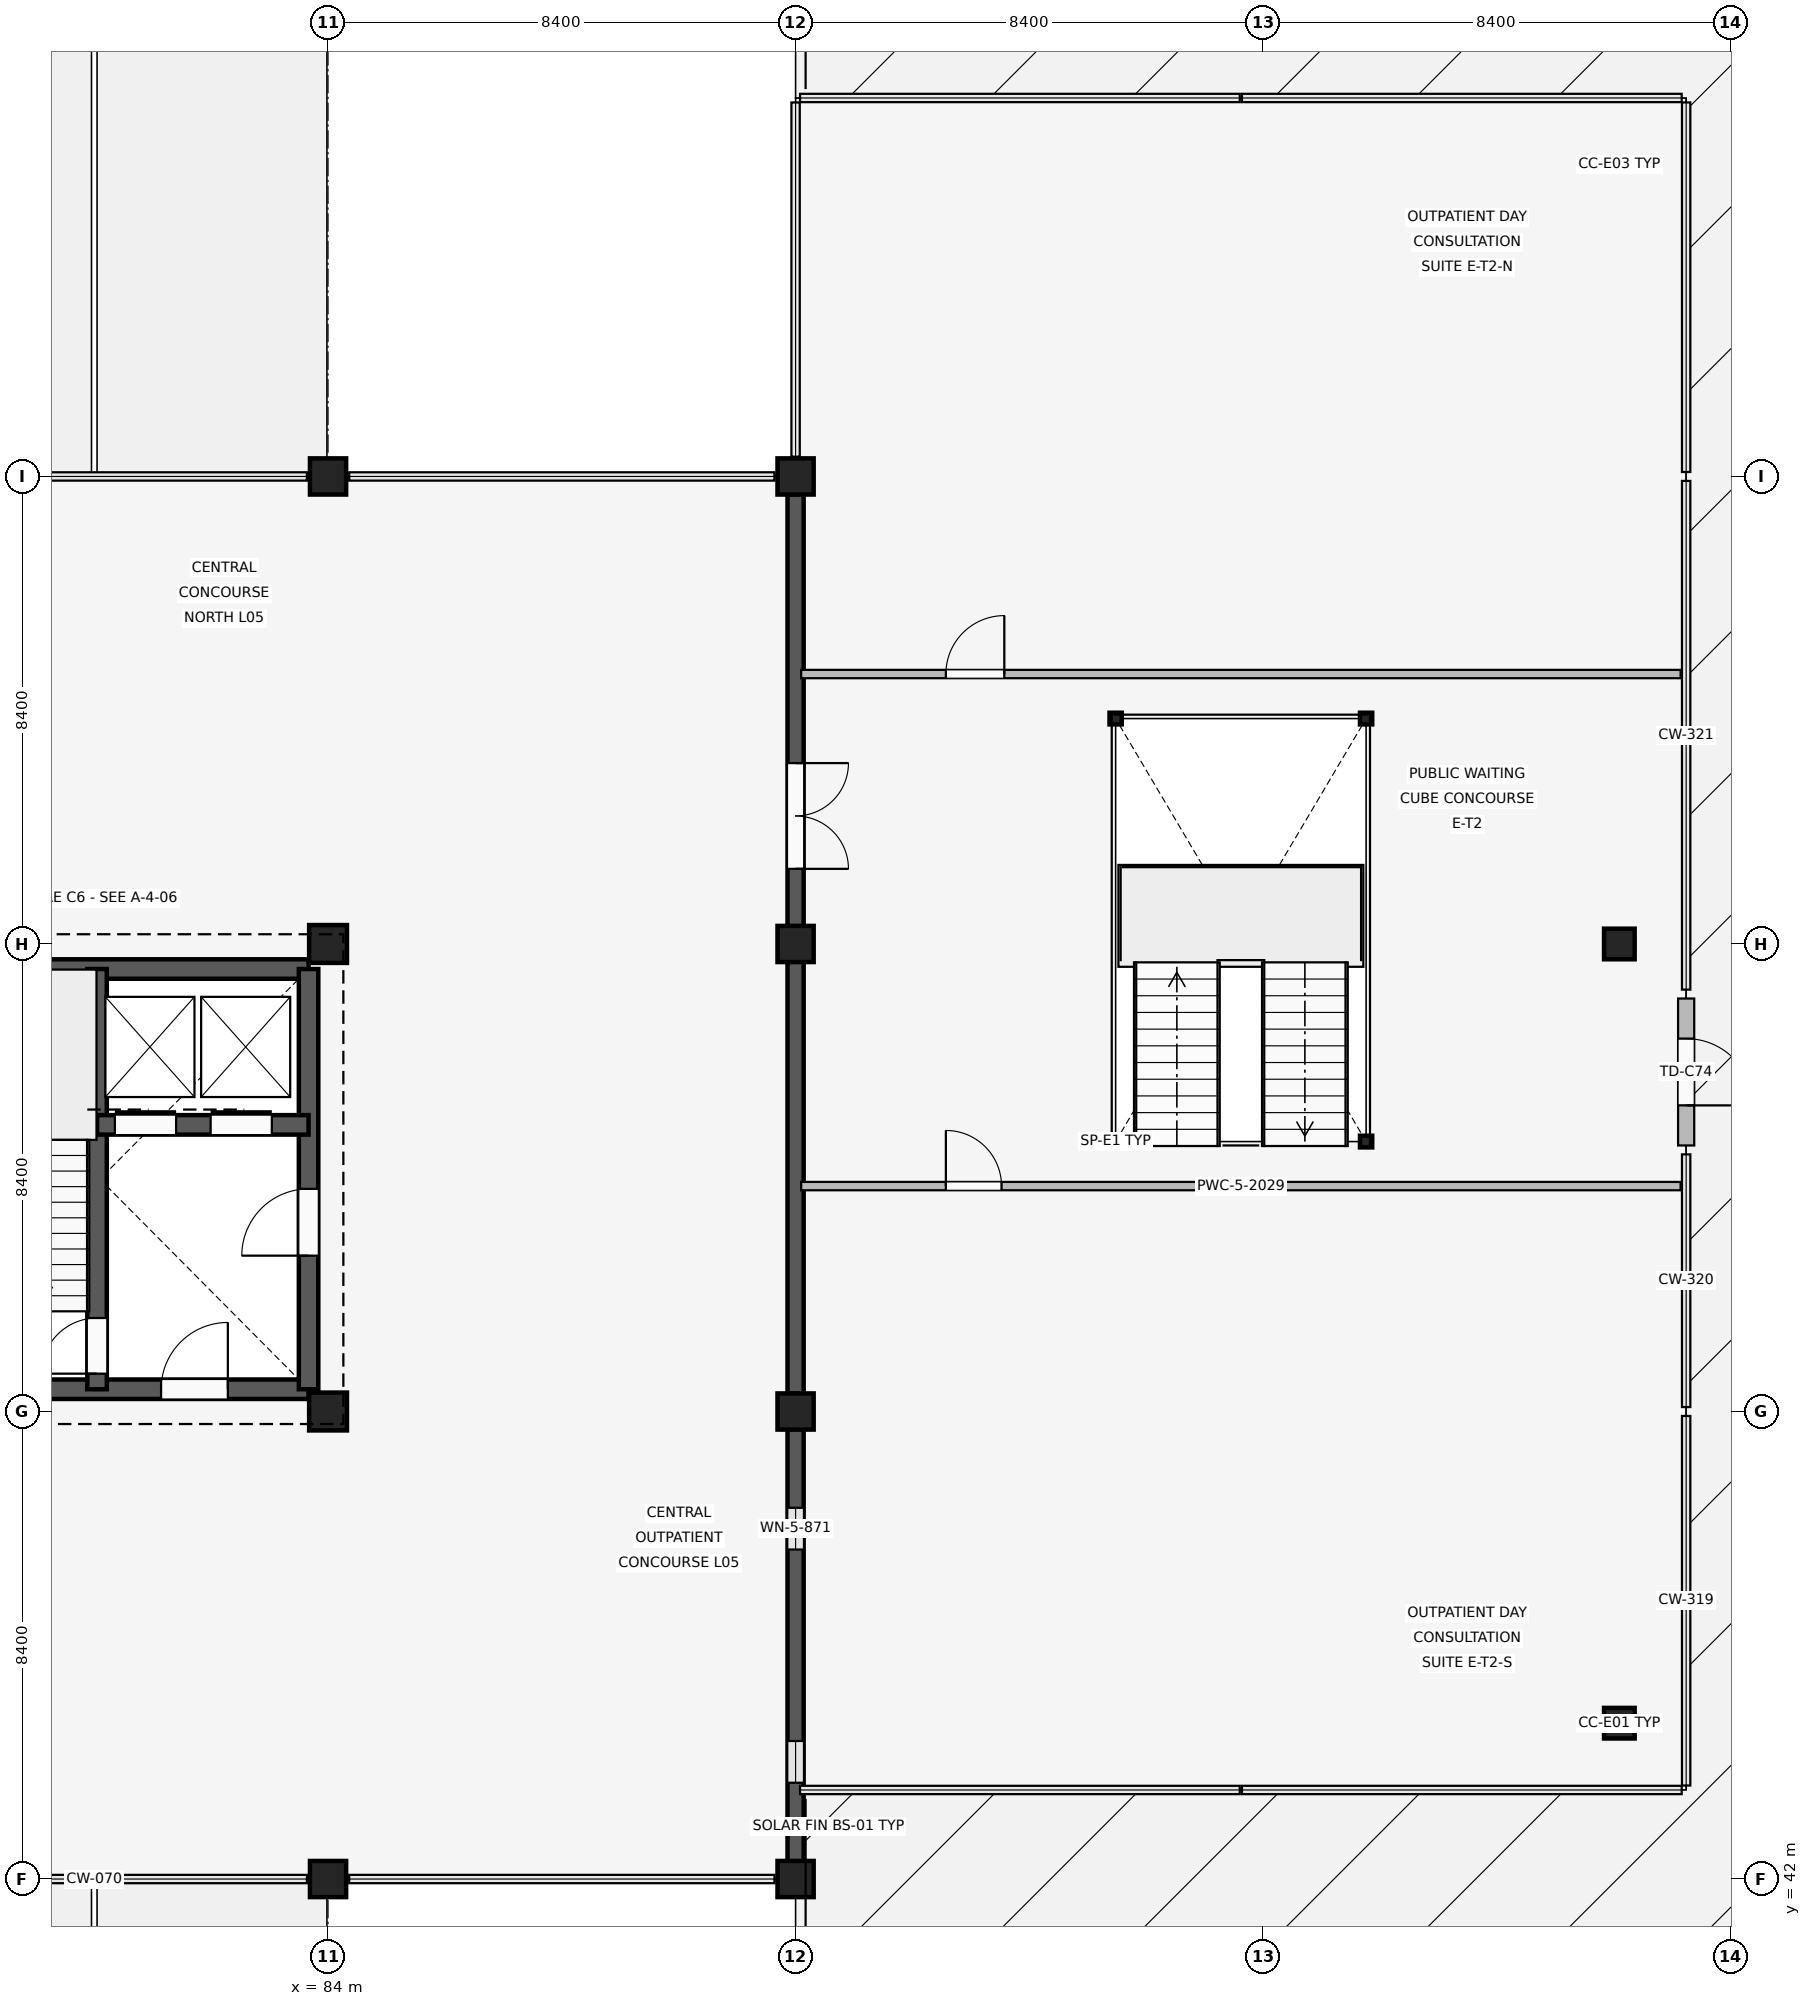
"""IFC4 building model, lengths in metres.
Left out: names, types, materials, properties, quantities, classifications, styles, units other than length and angle.
Written with IfcOpenShell. Run it as: python <this file> out.ifc"""

import sys

from ifc_helpers import new_model, si_unit, direction, frame, frame_2d, origin, origin_2d, place, context, subcontext, project, spatial, rectangle, i_section, extrude, element, fill, save


model = new_model("IFC4")
c1 = context("Model", 3, precision=1e-05, world=origin(), true_north=direction((0.0, 1.0)))
c2 = subcontext(c1, "Body", "Model", "MODEL_VIEW")
j1 = project(units=[si_unit("LENGTHUNIT", "METRE"), si_unit("PLANEANGLEUNIT", "RADIAN")], contexts=[c1])
p1 = place(None, origin())
s1 = spatial("IfcSite", under=j1, at=p1, CompositionType="ELEMENT")
p2 = place(p1, origin())
s2 = spatial("IfcBuilding", under=s1, at=p2, CompositionType="ELEMENT")
p3 = place(p2, frame((0.0, 0.0, 20.4)))
s3 = spatial("IfcBuildingStorey", under=s2, at=p3, CompositionType="ELEMENT", Elevation=20.4)
p4 = place(p3, frame((84.0, 42.0, 0.0), z_axis=(0.0, 0.0, 1.0), x_axis=(1.0, 0.0, 0.0)))
e1 = element("IfcColumn", 1, at=p4, inside=s3, PredefinedType="COLUMN", context=c2, shape_type="SweptSolid", body=[
    extrude(rectangle(XDim=0.65, YDim=0.65, at=origin_2d()), origin(), (0.0, 0.0, 1.0), 4.2),
])
for number, where, z_axis, x_axis in (
    (2, (84.0, 50.4, 0.0), (0.0, 0.0, 1.0), (1.0, 0.0, 0.0)),
    (3, (84.0, 58.8, 0.0), (0.0, 0.0, 1.0), (1.0, 0.0, 0.0)),
):
    element("IfcColumn", number, at=place(p3, frame(where, z_axis=z_axis, x_axis=x_axis)), inside=s3, PredefinedType="COLUMN", context=c2, shape_type="SweptSolid", body=[
        extrude(rectangle(XDim=0.68, YDim=0.68, at=origin_2d()), origin(), (0.0, 0.0, 1.0), 4.2),
    ])
for number, where, z_axis, x_axis in (
    (4, (84.0, 67.2, 0.0), (0.0, 0.0, 1.0), (1.0, 0.0, 0.0)),
    (5, (92.4, 42.0, 0.0), (0.0, 0.0, 1.0), (1.0, 0.0, 0.0)),
    (6, (92.4, 50.4, 0.0), (0.0, 0.0, 1.0), (1.0, 0.0, 0.0)),
    (7, (92.4, 58.8, 0.0), (0.0, 0.0, 1.0), (1.0, 0.0, 0.0)),
    (8, (92.4, 67.2, 0.0), (0.0, 0.0, 1.0), (1.0, 0.0, 0.0)),
):
    element("IfcColumn", number, at=place(p3, frame(where, z_axis=z_axis, x_axis=x_axis)), inside=s3, PredefinedType="COLUMN", context=c2, shape_type="SweptSolid", body=[
        extrude(rectangle(XDim=0.65, YDim=0.65, at=origin_2d()), origin(), (0.0, 0.0, 1.0), 4.2),
    ])
for number, where, z_axis, x_axis in (
    (9, (107.2, 44.8, 0.0), (0.0, 0.0, 1.0), (1.0, 0.0, 0.0)),
    (10, (107.2, 58.8, 0.0), (0.0, 0.0, 1.0), (1.0, 0.0, 0.0)),
):
    element("IfcColumn", number, at=place(p3, frame(where, z_axis=z_axis, x_axis=x_axis)), inside=s3, PredefinedType="COLUMN", context=c2, shape_type="SweptSolid", body=[
        extrude(rectangle(XDim=0.55, YDim=0.55, at=origin_2d()), origin(), (0.0, 0.0, 1.0), 4.2),
    ])
p5 = place(p3, frame((107.2, 72.8, 0.0), z_axis=(0.0, 0.0, 1.0), x_axis=(1.0, 0.0, 0.0)))
e11 = element("IfcColumn", 11, at=p5, inside=s3, PredefinedType="COLUMN", context=c2, shape_type="SweptSolid", body=[
    extrude(i_section(OverallWidth=0.22, OverallDepth=0.22, WebThickness=0.01, FlangeThickness=0.016, at=origin_2d()), origin(), (0.0, 0.0, 1.0), 4.2),
])
for number, where, z_axis, x_axis in (
    (12, (98.15, 55.25, 0.0), (0.0, 0.0, 1.0), (1.0, 0.0, 0.0)),
    (13, (102.65, 55.25, 0.0), (0.0, 0.0, 1.0), (1.0, 0.0, 0.0)),
    (14, (98.15, 62.85, 0.0), (0.0, 0.0, 1.0), (1.0, 0.0, 0.0)),
    (15, (102.65, 62.85, 0.0), (0.0, 0.0, 1.0), (1.0, 0.0, 0.0)),
):
    element("IfcColumn", number, at=place(p3, frame(where, z_axis=z_axis, x_axis=x_axis)), inside=s3, PredefinedType="COLUMN", context=c2, shape_type="SweptSolid", body=[
        extrude(i_section(OverallWidth=0.22, OverallDepth=0.21, WebThickness=0.007, FlangeThickness=0.011, at=origin_2d()), origin(), (0.0, 0.0, 1.0), 4.2),
    ])
p6 = place(p3, frame((92.4, 50.08, 0.0), z_axis=(0.0, 0.0, 1.0), x_axis=(0.0, -1.0, 0.0)))
e16 = element("IfcWall", 16, at=p6, inside=s3, PredefinedType="SOLIDWALL", context=c2, shape_type="SweptSolid", body=[
    extrude(rectangle(XDim=7.76, YDim=0.29, at=frame_2d((3.88, 0.0))), origin(), (0.0, 0.0, 1.0), 3.34),
])
p7 = place(p6, frame((1.41, 0.0, 0.85)))
e17 = element("IfcOpeningElement", 17, at=p7, cuts=e16, PredefinedType="OPENING", context=c2, shape_type="SweptSolid", body=[
    extrude(rectangle(XDim=0.75, YDim=1.85, at=frame_2d((0.375, 0.925))), frame((0.0, 0.155, 0.0), z_axis=(0.0, -1.0, 0.0), x_axis=(1.0, 0.0, 0.0)), (0.0, 0.0, 1.0), 0.31),
])
p8 = place(p6, frame((5.6, 0.0, 0.85)))
e18 = element("IfcOpeningElement", 18, at=p8, cuts=e16, PredefinedType="OPENING", context=c2, shape_type="SweptSolid", body=[
    extrude(rectangle(XDim=0.75, YDim=1.85, at=frame_2d((0.375, 0.925))), frame((0.0, 0.155, 0.0), z_axis=(0.0, -1.0, 0.0), x_axis=(1.0, 0.0, 0.0)), (0.0, 0.0, 1.0), 0.31),
])
p9 = place(p3, frame((92.4, 58.48, 0.0), z_axis=(0.0, 0.0, 1.0), x_axis=(0.0, -1.0, 0.0)))
e19 = element("IfcWall", 19, at=p9, inside=s3, PredefinedType="SOLIDWALL", context=c2, shape_type="SweptSolid", body=[
    extrude(rectangle(XDim=7.76, YDim=0.29, at=frame_2d((3.88, 0.0))), origin(), (0.0, 0.0, 1.0), 3.34),
])
p10 = place(p3, frame((92.4, 66.88, 0.0), z_axis=(0.0, 0.0, 1.0), x_axis=(0.0, -1.0, 0.0)))
e20 = element("IfcWall", 20, at=p10, inside=s3, PredefinedType="SOLIDWALL", context=c2, shape_type="SweptSolid", body=[
    extrude(rectangle(XDim=7.76, YDim=0.29, at=frame_2d((3.88, 0.0))), origin(), (0.0, 0.0, 1.0), 3.34),
])
p11 = place(p10, frame((4.83, 0.0, 0.0)))
e21 = element("IfcOpeningElement", 21, at=p11, cuts=e20, PredefinedType="OPENING", context=c2, shape_type="SweptSolid", body=[
    extrude(rectangle(XDim=1.9, YDim=2.4, at=frame_2d((0.95, 1.2))), frame((0.0, 0.155, 0.0), z_axis=(0.0, -1.0, 0.0), x_axis=(1.0, 0.0, 0.0)), (0.0, 0.0, 1.0), 0.31),
])
p12 = place(p3, frame((108.4, 57.82, 0.0), z_axis=(0.0, 0.0, 1.0), x_axis=(0.0, -1.0, 0.0)))
e22 = element("IfcWall", 22, at=p12, inside=s3, PredefinedType="SOLIDWALL", context=c2, shape_type="SweptSolid", body=[
    extrude(rectangle(XDim=2.64, YDim=0.29, at=frame_2d((1.32, 0.0))), origin(), (0.0, 0.0, 1.0), 3.96),
])
p13 = place(p12, frame((0.72, 0.0, 0.0)))
e23 = element("IfcOpeningElement", 23, at=p13, cuts=e22, PredefinedType="OPENING", context=c2, shape_type="SweptSolid", body=[
    extrude(rectangle(XDim=1.2, YDim=2.25, at=frame_2d((0.6, 1.125))), frame((0.0, 0.155, 0.0), z_axis=(0.0, -1.0, 0.0), x_axis=(1.0, 0.0, 0.0)), (0.0, 0.0, 1.0), 0.31),
])
p14 = place(p3, frame((76.15, 50.8, 0.0), z_axis=(0.0, 0.0, 1.0), x_axis=(1.0, 0.0, 0.0)))
e24 = element("IfcWall", 24, at=p14, inside=s3, PredefinedType="SHEAR", context=c2, shape_type="SweptSolid", body=[
    extrude(rectangle(XDim=7.5, YDim=0.35, at=frame_2d((3.75, 0.0))), origin(), (0.0, 0.0, 1.0), 3.92),
])
p15 = place(p14, frame((4.85, 0.0, 0.0)))
e25 = element("IfcOpeningElement", 25, at=p15, cuts=e24, PredefinedType="OPENING", context=c2, shape_type="SweptSolid", body=[
    extrude(rectangle(XDim=1.2, YDim=2.2, at=frame_2d((0.6, 1.1))), frame((0.0, 0.185, 0.0), z_axis=(0.0, -1.0, 0.0), x_axis=(1.0, 0.0, 0.0)), (0.0, 0.0, 1.0), 0.37),
])
p16 = place(p3, frame((76.15, 58.35, 0.0), z_axis=(0.0, 0.0, 1.0), x_axis=(1.0, 0.0, 0.0)))
e26 = element("IfcWall", 26, at=p16, inside=s3, PredefinedType="SHEAR", context=c2, shape_type="SweptSolid", body=[
    extrude(rectangle(XDim=7.5, YDim=0.35, at=frame_2d((3.75, 0.0))), origin(), (0.0, 0.0, 1.0), 3.92),
])
p17 = place(p3, frame((83.65, 50.8, 0.0), z_axis=(0.0, 0.0, 1.0), x_axis=(0.0, 1.0, 0.0)))
e27 = element("IfcWall", 27, at=p17, inside=s3, PredefinedType="SHEAR", context=c2, shape_type="SweptSolid", body=[
    extrude(rectangle(XDim=7.55, YDim=0.35, at=frame_2d((3.775, 0.0))), origin(), (0.0, 0.0, 1.0), 3.92),
])
p18 = place(p17, frame((2.4, 0.0, 0.0)))
e28 = element("IfcOpeningElement", 28, at=p18, cuts=e27, PredefinedType="OPENING", context=c2, shape_type="SweptSolid", body=[
    extrude(rectangle(XDim=1.2, YDim=2.2, at=frame_2d((0.6, 1.1))), frame((0.0, 0.185, 0.0), z_axis=(0.0, -1.0, 0.0), x_axis=(1.0, 0.0, 0.0)), (0.0, 0.0, 1.0), 0.37),
])
p19 = place(p3, frame((79.85, 50.8, 0.0), z_axis=(0.0, 0.0, 1.0), x_axis=(0.0, 1.0, 0.0)))
e29 = element("IfcWall", 29, at=p19, inside=s3, PredefinedType="SHEAR", context=c2, shape_type="SweptSolid", body=[
    extrude(rectangle(XDim=7.55, YDim=0.35, at=frame_2d((3.775, 0.0))), origin(), (0.0, 0.0, 1.0), 3.92),
])
p20 = place(p19, frame((0.28, 0.0, 0.0)))
e30 = element("IfcOpeningElement", 30, at=p20, cuts=e29, PredefinedType="OPENING", context=c2, shape_type="SweptSolid", body=[
    extrude(rectangle(XDim=1.0, YDim=2.15, at=frame_2d((0.5, 1.075))), frame((0.0, 0.185, 0.0), z_axis=(0.0, -1.0, 0.0), x_axis=(1.0, 0.0, 0.0)), (0.0, 0.0, 1.0), 0.37),
])
p21 = place(p3, frame((79.85, 55.55, 0.0), z_axis=(0.0, 0.0, 1.0), x_axis=(1.0, 0.0, 0.0)))
e31 = element("IfcWall", 31, at=p21, inside=s3, PredefinedType="SHEAR", context=c2, shape_type="SweptSolid", body=[
    extrude(rectangle(XDim=3.8, YDim=0.35, at=frame_2d((1.9, 0.0))), origin(), (0.0, 0.0, 1.0), 3.92),
])
p22 = place(p21, frame((0.32, 0.0, 0.0)))
e32 = element("IfcOpeningElement", 32, at=p22, cuts=e31, PredefinedType="OPENING", context=c2, shape_type="SweptSolid", body=[
    extrude(rectangle(XDim=1.1, YDim=2.15, at=frame_2d((0.55, 1.075))), frame((0.0, 0.185, 0.0), z_axis=(0.0, -1.0, 0.0), x_axis=(1.0, 0.0, 0.0)), (0.0, 0.0, 1.0), 0.37),
])
p23 = place(p21, frame((2.04, 0.0, 0.0)))
e33 = element("IfcOpeningElement", 33, at=p23, cuts=e31, PredefinedType="OPENING", context=c2, shape_type="SweptSolid", body=[
    extrude(rectangle(XDim=1.1, YDim=2.15, at=frame_2d((0.55, 1.075))), frame((0.0, 0.185, 0.0), z_axis=(0.0, -1.0, 0.0), x_axis=(1.0, 0.0, 0.0)), (0.0, 0.0, 1.0), 0.37),
])
p24 = place(p3, frame((92.5, 54.45, 0.0), z_axis=(0.0, 0.0, 1.0), x_axis=(1.0, 0.0, 0.0)))
e34 = element("IfcWall", 34, at=p24, inside=s3, PredefinedType="PARTITIONING", context=c2, shape_type="SweptSolid", body=[
    extrude(rectangle(XDim=15.8, YDim=0.15, at=frame_2d((7.9, 0.0))), origin(), (0.0, 0.0, 1.0), 3.49),
])
p25 = place(p24, frame((2.6, 0.0, 0.0)))
e35 = element("IfcOpeningElement", 35, at=p25, cuts=e34, PredefinedType="OPENING", context=c2, shape_type="SweptSolid", body=[
    extrude(rectangle(XDim=1.0, YDim=2.15, at=frame_2d((0.5, 1.075))), frame((0.0, 0.085, 0.0), z_axis=(0.0, -1.0, 0.0), x_axis=(1.0, 0.0, 0.0)), (0.0, 0.0, 1.0), 0.17),
])
p26 = place(p3, frame((92.5, 63.65, 0.0), z_axis=(0.0, 0.0, 1.0), x_axis=(1.0, 0.0, 0.0)))
e36 = element("IfcWall", 36, at=p26, inside=s3, PredefinedType="PARTITIONING", context=c2, shape_type="SweptSolid", body=[
    extrude(rectangle(XDim=15.8, YDim=0.15, at=frame_2d((7.9, 0.0))), origin(), (0.0, 0.0, 1.0), 3.49),
])
p27 = place(p26, frame((2.6, 0.0, 0.0)))
e37 = element("IfcOpeningElement", 37, at=p27, cuts=e36, PredefinedType="OPENING", context=c2, shape_type="SweptSolid", body=[
    extrude(rectangle(XDim=1.05, YDim=2.2, at=frame_2d((0.525, 1.1))), frame((0.0, 0.085, 0.0), z_axis=(0.0, -1.0, 0.0), x_axis=(1.0, 0.0, 0.0)), (0.0, 0.0, 1.0), 0.17),
])
p28 = place(p7, origin())
e38 = element("IfcWindow", 38, at=p28, inside=s3, PartitioningType="SINGLE_PANEL", PredefinedType="WINDOW", context=c2, shape_type="SweptSolid", body=[
    extrude(rectangle(XDim=0.75, YDim=1.85, at=frame_2d((0.375, 0.925))), frame((0.0, 0.03, 0.0), z_axis=(0.0, -1.0, 0.0), x_axis=(1.0, 0.0, 0.0)), (0.0, 0.0, 1.0), 0.06),
])
fill(e17, e38)
p29 = place(p8, origin())
e39 = element("IfcWindow", 39, at=p29, inside=s3, PartitioningType="SINGLE_PANEL", PredefinedType="WINDOW", context=c2, shape_type="SweptSolid", body=[
    extrude(rectangle(XDim=0.75, YDim=1.85, at=frame_2d((0.375, 0.925))), frame((0.0, 0.03, 0.0), z_axis=(0.0, -1.0, 0.0), x_axis=(1.0, 0.0, 0.0)), (0.0, 0.0, 1.0), 0.06),
])
fill(e18, e39)
p30 = place(p11, origin())
e40 = element("IfcDoor", 40, at=p30, inside=s3, OperationType="DOUBLE_SWING_LEFT", PredefinedType="DOOR", context=c2, shape_type="SweptSolid", body=[
    extrude(rectangle(XDim=1.9, YDim=2.4, at=frame_2d((0.95, 1.2))), frame((0.0, 0.025, 0.0), z_axis=(0.0, -1.0, 0.0), x_axis=(1.0, 0.0, 0.0)), (0.0, 0.0, 1.0), 0.05),
])
fill(e21, e40)
p31 = place(p13, origin())
e41 = element("IfcDoor", 41, at=p31, inside=s3, OperationType="SINGLE_SWING_RIGHT", PredefinedType="DOOR", context=c2, shape_type="SweptSolid", body=[
    extrude(rectangle(XDim=1.2, YDim=2.25, at=frame_2d((0.6, 1.125))), frame((0.0, 0.025, 0.0), z_axis=(0.0, -1.0, 0.0), x_axis=(1.0, 0.0, 0.0)), (0.0, 0.0, 1.0), 0.05),
])
fill(e23, e41)
p32 = place(p18, origin())
e42 = element("IfcDoor", 42, at=p32, inside=s3, OperationType="SINGLE_SWING_LEFT", PredefinedType="DOOR", context=c2, shape_type="SweptSolid", body=[
    extrude(rectangle(XDim=1.2, YDim=2.2, at=frame_2d((0.6, 1.1))), frame((0.0, 0.025, 0.0), z_axis=(0.0, -1.0, 0.0), x_axis=(1.0, 0.0, 0.0)), (0.0, 0.0, 1.0), 0.05),
])
fill(e28, e42)
p33 = place(p15, origin())
e43 = element("IfcDoor", 43, at=p33, inside=s3, OperationType="SINGLE_SWING_RIGHT", PredefinedType="DOOR", context=c2, shape_type="SweptSolid", body=[
    extrude(rectangle(XDim=1.2, YDim=2.2, at=frame_2d((0.6, 1.1))), frame((0.0, 0.025, 0.0), z_axis=(0.0, -1.0, 0.0), x_axis=(1.0, 0.0, 0.0)), (0.0, 0.0, 1.0), 0.05),
])
fill(e25, e43)
p34 = place(p20, origin())
e44 = element("IfcDoor", 44, at=p34, inside=s3, OperationType="SINGLE_SWING_LEFT", PredefinedType="DOOR", context=c2, shape_type="SweptSolid", body=[
    extrude(rectangle(XDim=1.0, YDim=2.15, at=frame_2d((0.5, 1.075))), frame((0.0, 0.025, 0.0), z_axis=(0.0, -1.0, 0.0), x_axis=(1.0, 0.0, 0.0)), (0.0, 0.0, 1.0), 0.05),
])
fill(e30, e44)
p35 = place(p22, origin())
e45 = element("IfcDoor", 45, at=p35, inside=s3, OperationType="SLIDING_TO_LEFT", PredefinedType="DOOR", context=c2, shape_type="SweptSolid", body=[
    extrude(rectangle(XDim=1.1, YDim=2.15, at=frame_2d((0.55, 1.075))), frame((0.0, 0.025, 0.0), z_axis=(0.0, -1.0, 0.0), x_axis=(1.0, 0.0, 0.0)), (0.0, 0.0, 1.0), 0.05),
])
fill(e32, e45)
p36 = place(p23, origin())
e46 = element("IfcDoor", 46, at=p36, inside=s3, OperationType="SLIDING_TO_LEFT", PredefinedType="DOOR", context=c2, shape_type="SweptSolid", body=[
    extrude(rectangle(XDim=1.1, YDim=2.15, at=frame_2d((0.55, 1.075))), frame((0.0, 0.025, 0.0), z_axis=(0.0, -1.0, 0.0), x_axis=(1.0, 0.0, 0.0)), (0.0, 0.0, 1.0), 0.05),
])
fill(e33, e46)
p37 = place(p25, origin())
e47 = element("IfcDoor", 47, at=p37, inside=s3, OperationType="SINGLE_SWING_LEFT", PredefinedType="DOOR", context=c2, shape_type="SweptSolid", body=[
    extrude(rectangle(XDim=1.0, YDim=2.15, at=frame_2d((0.5, 1.075))), frame((0.0, 0.025, 0.0), z_axis=(0.0, -1.0, 0.0), x_axis=(1.0, 0.0, 0.0)), (0.0, 0.0, 1.0), 0.05),
])
fill(e35, e47)
p38 = place(p27, origin())
e48 = element("IfcDoor", 48, at=p38, inside=s3, OperationType="SINGLE_SWING_RIGHT", PredefinedType="DOOR", context=c2, shape_type="SweptSolid", body=[
    extrude(rectangle(XDim=1.05, YDim=2.2, at=frame_2d((0.525, 1.1))), frame((0.0, 0.025, 0.0), z_axis=(0.0, -1.0, 0.0), x_axis=(1.0, 0.0, 0.0)), (0.0, 0.0, 1.0), 0.05),
])
fill(e37, e48)
save(model, sys.argv[1])
